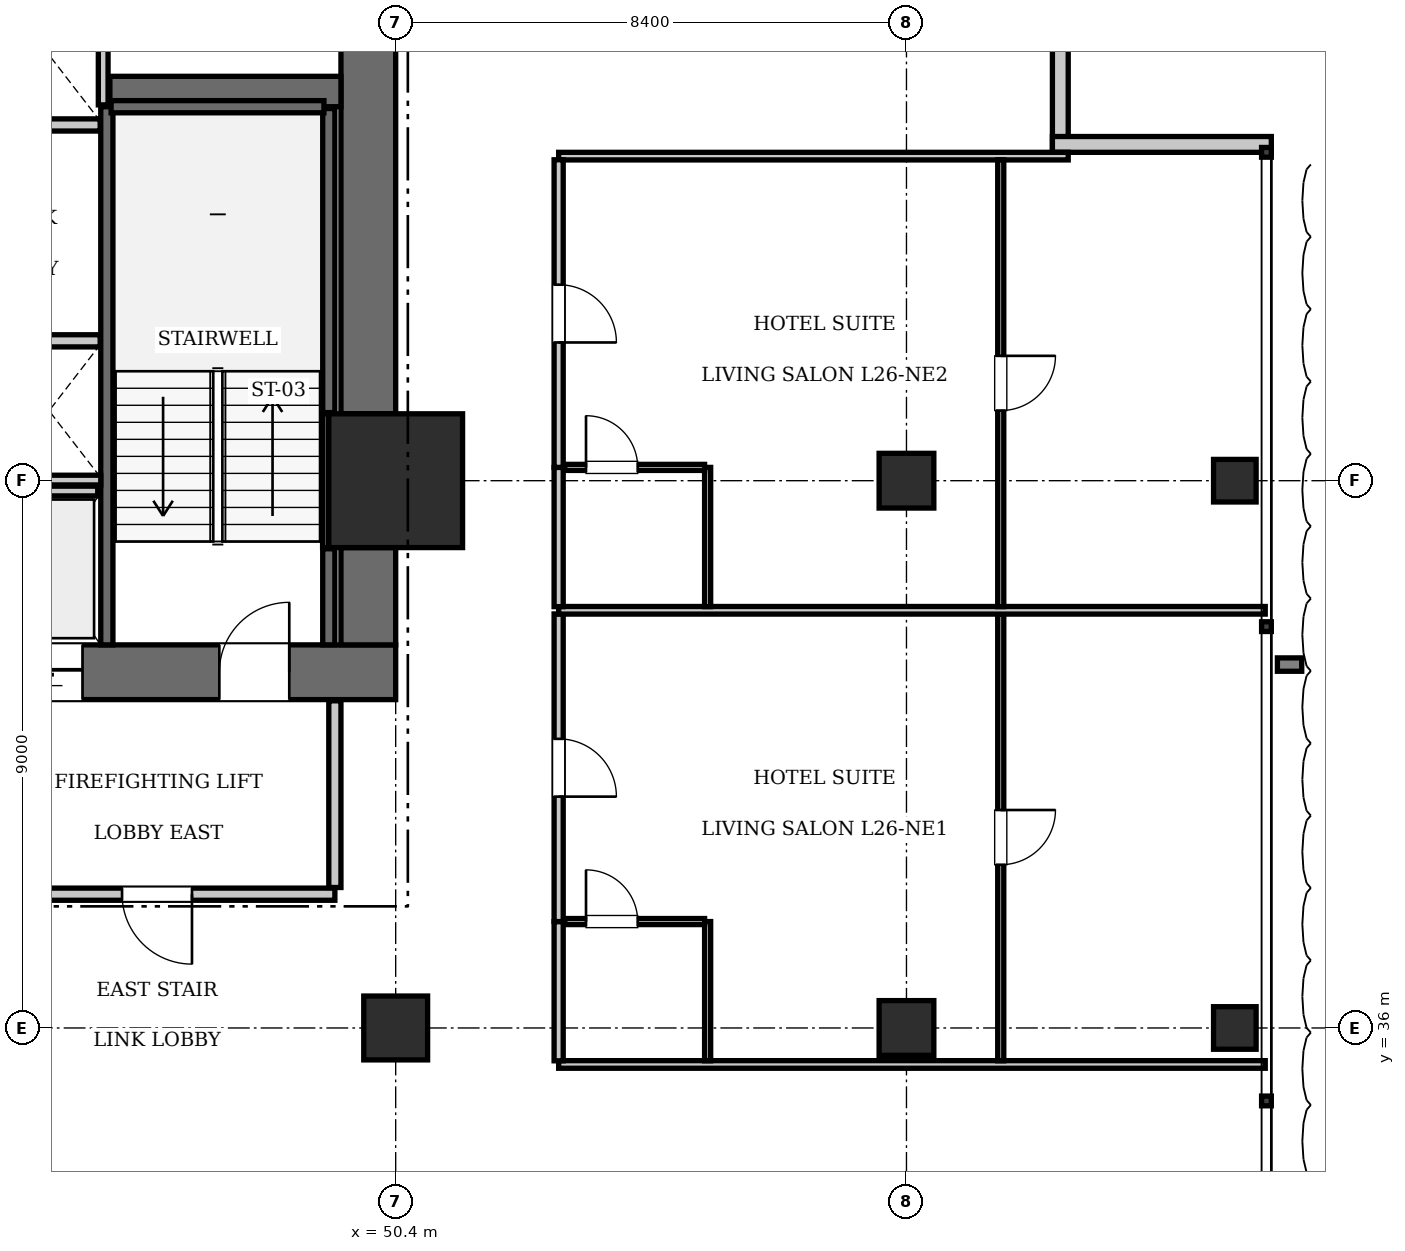
"""IFC4 building model, lengths in metres.
Left out: names, types, materials, properties, quantities, classifications, styles, units other than length and angle.
Written with IfcOpenShell. Run it as: python <this file> out.ifc"""

import sys

from ifc_helpers import new_model, si_unit, direction, frame, frame_2d, origin, origin_2d, place, context, subcontext, project, spatial, rectangle, i_section, extrude, element, fill, save


model = new_model("IFC4")
c1 = context("Model", 3, precision=1e-05, world=origin(), true_north=direction((0.0, 1.0)))
c2 = subcontext(c1, "Body", "Model", "MODEL_VIEW")
j1 = project(units=[si_unit("LENGTHUNIT", "METRE"), si_unit("PLANEANGLEUNIT", "RADIAN")], contexts=[c1])
p1 = place(None, origin())
s1 = spatial("IfcSite", under=j1, at=p1, CompositionType="ELEMENT")
p2 = place(p1, origin())
s2 = spatial("IfcBuilding", under=s1, at=p2, CompositionType="ELEMENT")
p3 = place(p2, frame((0.0, 0.0, 107.8)))
s3 = spatial("IfcBuildingStorey", under=s2, at=p3, CompositionType="ELEMENT", Elevation=107.8)
p4 = place(p3, frame((50.4, 45.0, 0.0), z_axis=(0.0, 0.0, 1.0), x_axis=(1.0, 0.0, 0.0)))
e1 = element("IfcColumn", 1, at=p4, inside=s3, PredefinedType="COLUMN", context=c2, shape_type="SweptSolid", body=[
    extrude(rectangle(XDim=2.2, YDim=2.2, at=origin_2d()), origin(), (0.0, 0.0, 1.0), 3.85),
])
p5 = place(p3, frame((43.6, 41.85, 0.0), z_axis=(0.0, 0.0, 1.0), x_axis=(1.0, 0.0, 0.0)))
e2 = element("IfcWall", 2, at=p5, inside=s3, PredefinedType="SHEAR", context=c2, shape_type="SweptSolid", body=[
    extrude(rectangle(XDim=6.8, YDim=0.9, at=frame_2d((3.4, 0.0))), origin(), (0.0, 0.0, 1.0), 3.85),
])
p6 = place(p5, frame((3.9, 0.0, 0.0)))
e3 = element("IfcOpeningElement", 3, at=p6, cuts=e2, PredefinedType="OPENING", context=c2, shape_type="SweptSolid", body=[
    extrude(rectangle(XDim=1.15, YDim=2.15, at=frame_2d((0.575, 1.075))), frame((0.0, 0.46, 0.0), z_axis=(0.0, -1.0, 0.0), x_axis=(1.0, 0.0, 0.0)), (0.0, 0.0, 1.0), 0.92),
])
p7 = place(p5, frame((0.55, 0.0, 0.0)))
e4 = element("IfcOpeningElement", 4, at=p7, cuts=e2, PredefinedType="OPENING", context=c2, shape_type="SweptSolid", body=[
    extrude(rectangle(XDim=1.1, YDim=2.2, at=frame_2d((0.55, 1.1))), frame((0.0, 0.46, 0.0), z_axis=(0.0, -1.0, 0.0), x_axis=(1.0, 0.0, 0.0)), (0.0, 0.0, 1.0), 0.92),
])
p8 = place(p3, frame((49.95, 42.3, 0.0), z_axis=(0.0, 0.0, 1.0), x_axis=(0.0, 1.0, 0.0)))
e5 = element("IfcWall", 5, at=p8, inside=s3, PredefinedType="SHEAR", context=c2, shape_type="SweptSolid", body=[
    extrude(rectangle(XDim=1.6, YDim=0.9, at=frame_2d((0.8, 0.0))), origin(), (0.0, 0.0, 1.0), 3.85),
])
p9 = place(p3, frame((49.95, 46.1, 0.0), z_axis=(0.0, 0.0, 1.0), x_axis=(0.0, 1.0, 0.0)))
e6 = element("IfcWall", 6, at=p9, inside=s3, PredefinedType="SHEAR", context=c2, shape_type="SweptSolid", body=[
    extrude(rectangle(XDim=7.0, YDim=0.9, at=frame_2d((3.5, 0.0))), origin(), (0.0, 0.0, 1.0), 3.85),
])
p10 = place(p3, frame((45.7, 51.4, 0.0), z_axis=(0.0, 0.0, 1.0), x_axis=(1.0, 0.0, 0.0)))
e7 = element("IfcWall", 7, at=p10, inside=s3, PredefinedType="SHEAR", context=c2, shape_type="SweptSolid", body=[
    extrude(rectangle(XDim=3.8, YDim=0.5, at=frame_2d((1.9, 0.0))), origin(), (0.0, 0.0, 1.0), 3.85),
])
p11 = place(p3, frame((50.4, 36.0, 0.0), z_axis=(0.0, 0.0, 1.0), x_axis=(1.0, 0.0, 0.0)))
e8 = element("IfcColumn", 8, at=p11, inside=s3, PredefinedType="COLUMN", context=c2, shape_type="SweptSolid", body=[
    extrude(rectangle(XDim=1.05, YDim=1.05, at=origin_2d()), origin(), (0.0, 0.0, 1.0), 3.85),
])
for number, where, z_axis, x_axis in (
    (9, (58.8, 36.0, 0.0), (0.0, 0.0, 1.0), (1.0, 0.0, 0.0)),
    (10, (58.8, 45.0, 0.0), (0.0, 0.0, 1.0), (1.0, 0.0, 0.0)),
):
    element("IfcColumn", number, at=place(p3, frame(where, z_axis=z_axis, x_axis=x_axis)), inside=s3, PredefinedType="COLUMN", context=c2, shape_type="SweptSolid", body=[
        extrude(rectangle(XDim=0.9, YDim=0.9, at=origin_2d()), origin(), (0.0, 0.0, 1.0), 3.85),
    ])
for number, where, z_axis, x_axis in (
    (11, (64.2, 36.0, 0.0), (0.0, 0.0, 1.0), (1.0, 0.0, 0.0)),
    (12, (64.2, 45.0, 0.0), (0.0, 0.0, 1.0), (1.0, 0.0, 0.0)),
):
    element("IfcColumn", number, at=place(p3, frame(where, z_axis=z_axis, x_axis=x_axis)), inside=s3, PredefinedType="COLUMN", context=c2, shape_type="SweptSolid", body=[
        extrude(i_section(OverallWidth=0.7, OverallDepth=0.7, WebThickness=0.028, FlangeThickness=0.044, at=origin_2d()), origin(), (0.0, 0.0, 1.0), 3.85),
    ])
p12 = place(p3, frame((45.65, 42.3, 0.0), z_axis=(0.0, 0.0, 1.0), x_axis=(0.0, 1.0, 0.0)))
e13 = element("IfcWall", 13, at=p12, inside=s3, PredefinedType="SOLIDWALL", context=c2, shape_type="SweptSolid", body=[
    extrude(rectangle(XDim=8.85, YDim=0.2, at=frame_2d((4.425, 0.0))), origin(), (0.0, 0.0, 1.0), 3.61),
])
p13 = place(p3, frame((49.3, 42.3, 0.0), z_axis=(0.0, 0.0, 1.0), x_axis=(0.0, 1.0, 0.0)))
e14 = element("IfcWall", 14, at=p13, inside=s3, PredefinedType="SOLIDWALL", context=c2, shape_type="SweptSolid", body=[
    extrude(rectangle(XDim=1.58, YDim=0.2, at=frame_2d((0.79, 0.0))), origin(), (0.0, 0.0, 1.0), 3.61),
])
p14 = place(p3, frame((49.3, 46.12, 0.0), z_axis=(0.0, 0.0, 1.0), x_axis=(0.0, 1.0, 0.0)))
e15 = element("IfcWall", 15, at=p14, inside=s3, PredefinedType="SOLIDWALL", context=c2, shape_type="SweptSolid", body=[
    extrude(rectangle(XDim=5.0, YDim=0.2, at=frame_2d((2.5, 0.0))), origin(), (0.0, 0.0, 1.0), 3.61),
])
p15 = place(p3, frame((45.72, 51.15, 0.0), z_axis=(0.0, 0.0, 1.0), x_axis=(1.0, 0.0, 0.0)))
e16 = element("IfcWall", 16, at=p15, inside=s3, PredefinedType="SOLIDWALL", context=c2, shape_type="SweptSolid", body=[
    extrude(rectangle(XDim=3.5, YDim=0.2, at=frame_2d((1.75, 0.0))), origin(), (0.0, 0.0, 1.0), 3.61),
])
p16 = place(p3, frame((49.248, 43.9, 0.0), z_axis=(0.0, 0.0, 1.0), x_axis=(0.0, 1.0, 0.0)))
e17 = element("IfcWall", 17, at=p16, inside=s3, PredefinedType="SOLIDWALL", context=c2, shape_type="SweptSolid", body=[
    extrude(rectangle(XDim=2.2, YDim=0.1, at=frame_2d((1.1, 0.0))), origin(), (0.0, 0.0, 1.0), 3.61),
])
for number, where, z_axis, x_axis in (
    (18, (43.86, 47.3, 0.0), (0.0, 0.0, 1.0), (1.0, 0.0, 0.0)),
    (19, (43.86, 50.85, 0.0), (0.0, 0.0, 1.0), (1.0, 0.0, 0.0)),
):
    element("IfcWall", number, at=place(p3, frame(where, z_axis=z_axis, x_axis=x_axis)), inside=s3, PredefinedType="SOLIDWALL", context=c2, shape_type="SweptSolid", body=[
        extrude(rectangle(XDim=1.68, YDim=0.2, at=frame_2d((0.84, 0.0))), origin(), (0.0, 0.0, 1.0), 3.61),
    ])
p17 = place(p3, frame((43.9, 44.83, 0.0), z_axis=(0.0, 0.0, 1.0), x_axis=(1.0, 0.0, 0.0)))
e20 = element("IfcWall", 20, at=p17, inside=s3, PredefinedType="SOLIDWALL", context=c2, shape_type="SweptSolid", body=[
    extrude(rectangle(XDim=1.6, YDim=0.16, at=frame_2d((0.8, 0.0))), origin(), (0.0, 0.0, 1.0), 3.61),
])
p18 = place(p3, frame((42.1, 45.01, 0.0), z_axis=(0.0, 0.0, 1.0), x_axis=(1.0, 0.0, 0.0)))
e21 = element("IfcWall", 21, at=p18, inside=s3, PredefinedType="SOLIDWALL", context=c2, shape_type="SweptSolid", body=[
    extrude(rectangle(XDim=3.45, YDim=0.16, at=frame_2d((1.725, 0.0))), origin(), (0.0, 0.0, 1.0), 3.61),
])
p19 = place(p3, frame((45.59, 51.18, 0.0), z_axis=(0.0, 0.0, 1.0), x_axis=(0.0, 1.0, 0.0)))
e22 = element("IfcWall", 22, at=p19, inside=s3, PredefinedType="SOLIDWALL", context=c2, shape_type="SweptSolid", body=[
    extrude(rectangle(XDim=1.92, YDim=0.16, at=frame_2d((0.96, 0.0))), origin(), (0.0, 0.0, 1.0), 3.61),
])
for number, where, z_axis, x_axis in (
    (23, (61.33, 54.0, 0.0), (0.0, 0.0, 1.0), (0.0, -1.0, 0.0)),
    (24, (61.2, 50.53, 0.0), (0.0, 0.0, 1.0), (1.0, 0.0, 0.0)),
):
    element("IfcWall", number, at=place(p3, frame(where, z_axis=z_axis, x_axis=x_axis)), inside=s3, PredefinedType="SOLIDWALL", context=c2, shape_type="SweptSolid", body=[
        extrude(rectangle(XDim=3.6, YDim=0.26, at=frame_2d((1.8, 0.0))), origin(), (0.0, 0.0, 1.0), 3.61),
    ])
p20 = place(p3, frame((43.6, 38.2, 0.0), z_axis=(0.0, 0.0, 1.0), x_axis=(1.0, 0.0, 0.0)))
e25 = element("IfcWall", 25, at=p20, inside=s3, PredefinedType="PARTITIONING", context=c2, shape_type="SweptSolid", body=[
    extrude(rectangle(XDim=5.8, YDim=0.2, at=frame_2d((2.9, 0.0))), origin(), (0.0, 0.0, 1.0), 3.61),
])
p21 = place(p20, frame((2.3, 0.0, 0.0)))
e26 = element("IfcOpeningElement", 26, at=p21, cuts=e25, PredefinedType="OPENING", context=c2, shape_type="SweptSolid", body=[
    extrude(rectangle(XDim=1.15, YDim=2.15, at=frame_2d((0.575, 1.075))), frame((0.0, 0.11, 0.0), z_axis=(0.0, -1.0, 0.0), x_axis=(1.0, 0.0, 0.0)), (0.0, 0.0, 1.0), 0.22),
])
p22 = place(p3, frame((49.4, 38.31, 0.0), z_axis=(0.0, 0.0, 1.0), x_axis=(0.0, 1.0, 0.0)))
e27 = element("IfcWall", 27, at=p22, inside=s3, PredefinedType="PARTITIONING", context=c2, shape_type="SweptSolid", body=[
    extrude(rectangle(XDim=3.07, YDim=0.2, at=frame_2d((1.535, 0.0))), origin(), (0.0, 0.0, 1.0), 3.61),
])
p23 = place(p3, frame((53.08, 35.4, 0.0), z_axis=(0.0, 0.0, 1.0), x_axis=(1.0, 0.0, 0.0)))
e28 = element("IfcWall", 28, at=p23, inside=s3, PredefinedType="PARTITIONING", context=c2, shape_type="SweptSolid", body=[
    extrude(rectangle(XDim=11.62, YDim=0.125, at=frame_2d((5.81, 0.0))), origin(), (0.0, 0.0, 1.0), 3.61),
])
p24 = place(p3, frame((53.08, 50.337, 0.0), z_axis=(0.0, 0.0, 1.0), x_axis=(1.0, 0.0, 0.0)))
e29 = element("IfcWall", 29, at=p24, inside=s3, PredefinedType="PARTITIONING", context=c2, shape_type="SweptSolid", body=[
    extrude(rectangle(XDim=8.38, YDim=0.125, at=frame_2d((4.19, 0.0))), origin(), (0.0, 0.0, 1.0), 3.61),
])
p25 = place(p3, frame((53.08, 35.46, 0.0), z_axis=(0.0, 0.0, 1.0), x_axis=(0.0, 1.0, 0.0)))
e30 = element("IfcWall", 30, at=p25, inside=s3, PredefinedType="PARTITIONING", context=c2, shape_type="SweptSolid", body=[
    extrude(rectangle(XDim=2.29, YDim=0.15, at=frame_2d((1.145, 0.0))), origin(), (0.0, 0.0, 1.0), 3.61),
])
p26 = place(p3, frame((53.08, 37.75, 0.0), z_axis=(0.0, 0.0, 1.0), x_axis=(0.0, 1.0, 0.0)))
e31 = element("IfcWall", 31, at=p26, inside=s3, PredefinedType="PARTITIONING", context=c2, shape_type="SweptSolid", body=[
    extrude(rectangle(XDim=5.059, YDim=0.15, at=frame_2d((2.529, 0.0))), origin(), (0.0, 0.0, 1.0), 3.61),
])
p27 = place(p26, frame((2.054, 0.0, 0.0)))
e32 = element("IfcOpeningElement", 32, at=p27, cuts=e31, PredefinedType="OPENING", context=c2, shape_type="SweptSolid", body=[
    extrude(rectangle(XDim=0.95, YDim=2.15, at=frame_2d((0.475, 1.075))), frame((0.0, 0.085, 0.0), z_axis=(0.0, -1.0, 0.0), x_axis=(1.0, 0.0, 0.0)), (0.0, 0.0, 1.0), 0.17),
])
p28 = place(p3, frame((55.53, 35.46, 0.0), z_axis=(0.0, 0.0, 1.0), x_axis=(0.0, 1.0, 0.0)))
e33 = element("IfcWall", 33, at=p28, inside=s3, PredefinedType="PARTITIONING", context=c2, shape_type="SweptSolid", body=[
    extrude(rectangle(XDim=2.29, YDim=0.1, at=frame_2d((1.145, 0.0))), origin(), (0.0, 0.0, 1.0), 3.61),
])
p29 = place(p3, frame((53.18, 37.75, 0.0), z_axis=(0.0, 0.0, 1.0), x_axis=(1.0, 0.0, 0.0)))
e34 = element("IfcWall", 34, at=p29, inside=s3, PredefinedType="PARTITIONING", context=c2, shape_type="SweptSolid", body=[
    extrude(rectangle(XDim=2.3, YDim=0.1, at=frame_2d((1.15, 0.0))), origin(), (0.0, 0.0, 1.0), 3.61),
])
p30 = place(p29, frame((0.35, 0.0, 0.0)))
e35 = element("IfcOpeningElement", 35, at=p30, cuts=e34, PredefinedType="OPENING", context=c2, shape_type="SweptSolid", body=[
    extrude(rectangle(XDim=0.85, YDim=2.1, at=frame_2d((0.425, 1.05))), frame((0.0, 0.06, 0.0), z_axis=(0.0, -1.0, 0.0), x_axis=(1.0, 0.0, 0.0)), (0.0, 0.0, 1.0), 0.12),
])
p31 = place(p3, frame((60.35, 35.46, 0.0), z_axis=(0.0, 0.0, 1.0), x_axis=(0.0, 1.0, 0.0)))
e36 = element("IfcWall", 36, at=p31, inside=s3, PredefinedType="PARTITIONING", context=c2, shape_type="SweptSolid", body=[
    extrude(rectangle(XDim=7.349, YDim=0.1, at=frame_2d((3.674, 0.0))), origin(), (0.0, 0.0, 1.0), 3.61),
])
p32 = place(p31, frame((3.224, 0.0, 0.0)))
e37 = element("IfcOpeningElement", 37, at=p32, cuts=e36, PredefinedType="OPENING", context=c2, shape_type="SweptSolid", body=[
    extrude(rectangle(XDim=0.9, YDim=2.1, at=frame_2d((0.45, 1.05))), frame((0.0, 0.06, 0.0), z_axis=(0.0, -1.0, 0.0), x_axis=(1.0, 0.0, 0.0)), (0.0, 0.0, 1.0), 0.12),
])
p33 = place(p3, frame((53.08, 42.869, 0.0), z_axis=(0.0, 0.0, 1.0), x_axis=(1.0, 0.0, 0.0)))
e38 = element("IfcWall", 38, at=p33, inside=s3, PredefinedType="PARTITIONING", context=c2, shape_type="SweptSolid", body=[
    extrude(rectangle(XDim=11.62, YDim=0.125, at=frame_2d((5.81, 0.0))), origin(), (0.0, 0.0, 1.0), 3.61),
])
p34 = place(p3, frame((53.08, 42.929, 0.0), z_axis=(0.0, 0.0, 1.0), x_axis=(0.0, 1.0, 0.0)))
e39 = element("IfcWall", 39, at=p34, inside=s3, PredefinedType="PARTITIONING", context=c2, shape_type="SweptSolid", body=[
    extrude(rectangle(XDim=2.29, YDim=0.15, at=frame_2d((1.145, 0.0))), origin(), (0.0, 0.0, 1.0), 3.61),
])
p35 = place(p3, frame((53.08, 45.219, 0.0), z_axis=(0.0, 0.0, 1.0), x_axis=(0.0, 1.0, 0.0)))
e40 = element("IfcWall", 40, at=p35, inside=s3, PredefinedType="PARTITIONING", context=c2, shape_type="SweptSolid", body=[
    extrude(rectangle(XDim=5.059, YDim=0.15, at=frame_2d((2.529, 0.0))), origin(), (0.0, 0.0, 1.0), 3.61),
])
p36 = place(p35, frame((2.054, 0.0, 0.0)))
e41 = element("IfcOpeningElement", 41, at=p36, cuts=e40, PredefinedType="OPENING", context=c2, shape_type="SweptSolid", body=[
    extrude(rectangle(XDim=0.95, YDim=2.15, at=frame_2d((0.475, 1.075))), frame((0.0, 0.085, 0.0), z_axis=(0.0, -1.0, 0.0), x_axis=(1.0, 0.0, 0.0)), (0.0, 0.0, 1.0), 0.17),
])
p37 = place(p3, frame((55.53, 42.929, 0.0), z_axis=(0.0, 0.0, 1.0), x_axis=(0.0, 1.0, 0.0)))
e42 = element("IfcWall", 42, at=p37, inside=s3, PredefinedType="PARTITIONING", context=c2, shape_type="SweptSolid", body=[
    extrude(rectangle(XDim=2.29, YDim=0.1, at=frame_2d((1.145, 0.0))), origin(), (0.0, 0.0, 1.0), 3.61),
])
p38 = place(p3, frame((53.18, 45.219, 0.0), z_axis=(0.0, 0.0, 1.0), x_axis=(1.0, 0.0, 0.0)))
e43 = element("IfcWall", 43, at=p38, inside=s3, PredefinedType="PARTITIONING", context=c2, shape_type="SweptSolid", body=[
    extrude(rectangle(XDim=2.3, YDim=0.1, at=frame_2d((1.15, 0.0))), origin(), (0.0, 0.0, 1.0), 3.61),
])
p39 = place(p38, frame((0.35, 0.0, 0.0)))
e44 = element("IfcOpeningElement", 44, at=p39, cuts=e43, PredefinedType="OPENING", context=c2, shape_type="SweptSolid", body=[
    extrude(rectangle(XDim=0.85, YDim=2.1, at=frame_2d((0.425, 1.05))), frame((0.0, 0.06, 0.0), z_axis=(0.0, -1.0, 0.0), x_axis=(1.0, 0.0, 0.0)), (0.0, 0.0, 1.0), 0.12),
])
p40 = place(p3, frame((60.35, 42.929, 0.0), z_axis=(0.0, 0.0, 1.0), x_axis=(0.0, 1.0, 0.0)))
e45 = element("IfcWall", 45, at=p40, inside=s3, PredefinedType="PARTITIONING", context=c2, shape_type="SweptSolid", body=[
    extrude(rectangle(XDim=7.349, YDim=0.1, at=frame_2d((3.674, 0.0))), origin(), (0.0, 0.0, 1.0), 3.61),
])
p41 = place(p40, frame((3.224, 0.0, 0.0)))
e46 = element("IfcOpeningElement", 46, at=p41, cuts=e45, PredefinedType="OPENING", context=c2, shape_type="SweptSolid", body=[
    extrude(rectangle(XDim=0.9, YDim=2.1, at=frame_2d((0.45, 1.05))), frame((0.0, 0.06, 0.0), z_axis=(0.0, -1.0, 0.0), x_axis=(1.0, 0.0, 0.0)), (0.0, 0.0, 1.0), 0.12),
])
p42 = place(p6, origin())
e47 = element("IfcDoor", 47, at=p42, inside=s3, OperationType="SINGLE_SWING_RIGHT", PredefinedType="DOOR", context=c2, shape_type="SweptSolid", body=[
    extrude(rectangle(XDim=1.15, YDim=2.15, at=frame_2d((0.575, 1.075))), frame((0.0, 0.025, 0.0), z_axis=(0.0, -1.0, 0.0), x_axis=(1.0, 0.0, 0.0)), (0.0, 0.0, 1.0), 0.05),
])
fill(e3, e47)
p43 = place(p7, frame((1.1, 0.0, 0.0), z_axis=(0.0, 0.0, 1.0), x_axis=(-1.0, 0.0, 0.0)))
e48 = element("IfcDoor", 48, at=p43, inside=s3, OperationType="SLIDING_TO_LEFT", PredefinedType="DOOR", context=c2, shape_type="SweptSolid", body=[
    extrude(rectangle(XDim=1.1, YDim=2.2, at=frame_2d((0.55, 1.1))), frame((0.0, 0.025, 0.0), z_axis=(0.0, -1.0, 0.0), x_axis=(1.0, 0.0, 0.0)), (0.0, 0.0, 1.0), 0.05),
])
fill(e4, e48)
p44 = place(p21, frame((1.15, 0.0, 0.0), z_axis=(0.0, 0.0, 1.0), x_axis=(-1.0, 0.0, 0.0)))
e49 = element("IfcDoor", 49, at=p44, inside=s3, OperationType="SINGLE_SWING_LEFT", PredefinedType="DOOR", context=c2, shape_type="SweptSolid", body=[
    extrude(rectangle(XDim=1.15, YDim=2.15, at=frame_2d((0.575, 1.075))), frame((0.0, 0.025, 0.0), z_axis=(0.0, -1.0, 0.0), x_axis=(1.0, 0.0, 0.0)), (0.0, 0.0, 1.0), 0.05),
])
fill(e26, e49)
p45 = place(p30, origin())
e50 = element("IfcDoor", 50, at=p45, inside=s3, OperationType="SINGLE_SWING_LEFT", PredefinedType="DOOR", context=c2, shape_type="SweptSolid", body=[
    extrude(rectangle(XDim=0.85, YDim=2.1, at=frame_2d((0.425, 1.05))), frame((0.0, 0.025, 0.0), z_axis=(0.0, -1.0, 0.0), x_axis=(1.0, 0.0, 0.0)), (0.0, 0.0, 1.0), 0.05),
])
fill(e35, e50)
p46 = place(p27, frame((0.95, 0.0, 0.0), z_axis=(0.0, 0.0, 1.0), x_axis=(-1.0, 0.0, 0.0)))
e51 = element("IfcDoor", 51, at=p46, inside=s3, OperationType="SINGLE_SWING_RIGHT", PredefinedType="DOOR", context=c2, shape_type="SweptSolid", body=[
    extrude(rectangle(XDim=0.95, YDim=2.15, at=frame_2d((0.475, 1.075))), frame((0.0, 0.025, 0.0), z_axis=(0.0, -1.0, 0.0), x_axis=(1.0, 0.0, 0.0)), (0.0, 0.0, 1.0), 0.05),
])
fill(e32, e51)
p47 = place(p32, frame((0.9, 0.0, 0.0), z_axis=(0.0, 0.0, 1.0), x_axis=(-1.0, 0.0, 0.0)))
e52 = element("IfcDoor", 52, at=p47, inside=s3, OperationType="SINGLE_SWING_LEFT", PredefinedType="DOOR", context=c2, shape_type="SweptSolid", body=[
    extrude(rectangle(XDim=0.9, YDim=2.1, at=frame_2d((0.45, 1.05))), frame((0.0, 0.025, 0.0), z_axis=(0.0, -1.0, 0.0), x_axis=(1.0, 0.0, 0.0)), (0.0, 0.0, 1.0), 0.05),
])
fill(e37, e52)
p48 = place(p39, origin())
e53 = element("IfcDoor", 53, at=p48, inside=s3, OperationType="SINGLE_SWING_LEFT", PredefinedType="DOOR", context=c2, shape_type="SweptSolid", body=[
    extrude(rectangle(XDim=0.85, YDim=2.1, at=frame_2d((0.425, 1.05))), frame((0.0, 0.025, 0.0), z_axis=(0.0, -1.0, 0.0), x_axis=(1.0, 0.0, 0.0)), (0.0, 0.0, 1.0), 0.05),
])
fill(e44, e53)
p49 = place(p36, frame((0.95, 0.0, 0.0), z_axis=(0.0, 0.0, 1.0), x_axis=(-1.0, 0.0, 0.0)))
e54 = element("IfcDoor", 54, at=p49, inside=s3, OperationType="SINGLE_SWING_RIGHT", PredefinedType="DOOR", context=c2, shape_type="SweptSolid", body=[
    extrude(rectangle(XDim=0.95, YDim=2.15, at=frame_2d((0.475, 1.075))), frame((0.0, 0.025, 0.0), z_axis=(0.0, -1.0, 0.0), x_axis=(1.0, 0.0, 0.0)), (0.0, 0.0, 1.0), 0.05),
])
fill(e41, e54)
p50 = place(p41, frame((0.9, 0.0, 0.0), z_axis=(0.0, 0.0, 1.0), x_axis=(-1.0, 0.0, 0.0)))
e55 = element("IfcDoor", 55, at=p50, inside=s3, OperationType="SINGLE_SWING_LEFT", PredefinedType="DOOR", context=c2, shape_type="SweptSolid", body=[
    extrude(rectangle(XDim=0.9, YDim=2.1, at=frame_2d((0.45, 1.05))), frame((0.0, 0.025, 0.0), z_axis=(0.0, -1.0, 0.0), x_axis=(1.0, 0.0, 0.0)), (0.0, 0.0, 1.0), 0.05),
])
fill(e46, e55)
save(model, sys.argv[1])
